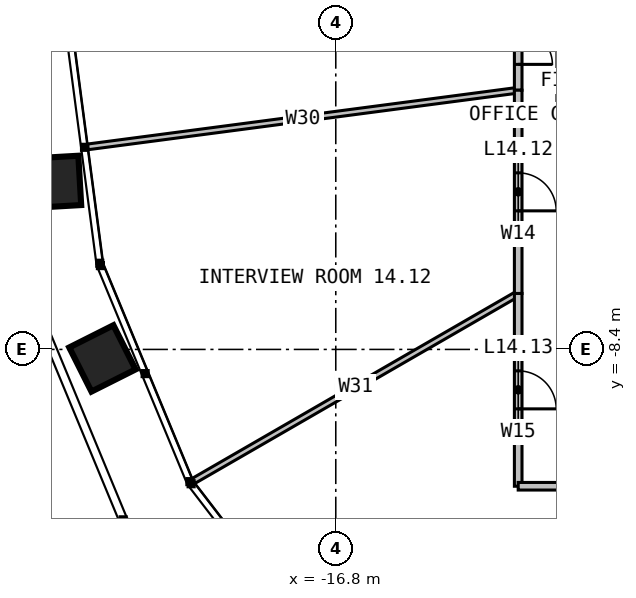
"""IFC4 building model, lengths in metres.
Left out: names, types, materials, properties, quantities, classifications, styles, units other than length and angle.
Written with IfcOpenShell. Run it as: python <this file> out.ifc"""

import sys

from ifc_helpers import new_model, si_unit, direction, frame, frame_2d, origin, place, context, subcontext, project, spatial, rectangle, extrude, element, fill, save


model = new_model("IFC4")
c1 = context("Model", 3, precision=1e-05, world=origin(), true_north=direction((0.0, 1.0)))
c2 = subcontext(c1, "Body", "Model", "MODEL_VIEW")
j1 = project(units=[si_unit("LENGTHUNIT", "METRE"), si_unit("PLANEANGLEUNIT", "RADIAN")], contexts=[c1])
p1 = place(None, origin())
s1 = spatial("IfcSite", under=j1, at=p1, CompositionType="ELEMENT")
p2 = place(p1, origin())
s2 = spatial("IfcBuilding", under=s1, at=p2, CompositionType="ELEMENT")
p3 = place(p2, frame((0.0, 0.0, 61.0)))
s3 = spatial("IfcBuildingStorey", under=s2, at=p3, CompositionType="ELEMENT", Elevation=61.0)
p4 = place(p3, frame((-12.0, -1.58, 0.0), z_axis=(0.0, 0.0, 1.0), x_axis=(-0.99144592532, -0.130518110492, 0.0)))
e1 = element("IfcWall", 1, at=p4, inside=s3, PredefinedType="PARTITIONING", context=c2, shape_type="SweptSolid", body=[
    extrude(rectangle(XDim=11.42, YDim=0.15, at=frame_2d((5.71, 0.0))), origin(), (0.0, 0.0, 1.0), 2.79),
])
for number, where, z_axis, x_axis in (
    (2, (-12.0, -6.928, 0.0), (0.0, 0.0, 1.0), (-0.866, -0.5, 0.0)),
    (3, (-6.928, -12.0, 0.0), (0.0, 0.0, 1.0), (-0.5, -0.866, 0.0)),
):
    element("IfcWall", number, at=place(p3, frame(where, z_axis=z_axis, x_axis=x_axis)), inside=s3, PredefinedType="PARTITIONING", context=c2, shape_type="SweptSolid", body=[
        extrude(rectangle(XDim=9.87, YDim=0.15, at=frame_2d((4.935, 0.0))), origin(), (0.0, 0.0, 1.0), 2.79),
    ])
p5 = place(p3, frame((-12.0, 1.58, 0.0), z_axis=(0.0, 0.0, 1.0), x_axis=(0.0, -1.0, 0.0)))
e4 = element("IfcWall", 4, at=p5, inside=s3, PredefinedType="PARTITIONING", context=c2, shape_type="SweptSolid", body=[
    extrude(rectangle(XDim=3.16, YDim=0.2, at=frame_2d((1.58, 0.0))), origin(), (0.0, 0.0, 1.0), 3.8),
])
p6 = place(p5, frame((0.68, 0.0, 0.0)))
e5 = element("IfcOpeningElement", 5, at=p6, cuts=e4, PredefinedType="OPENING", context=c2, shape_type="SweptSolid", body=[
    extrude(rectangle(XDim=1.8, YDim=2.2, at=frame_2d((0.9, 1.1))), frame((0.0, 0.11, 0.0), z_axis=(0.0, -1.0, 0.0), x_axis=(1.0, 0.0, 0.0)), (0.0, 0.0, 1.0), 0.22),
])
p7 = place(p3, frame((-12.0, -1.58, 0.0), z_axis=(0.0, 0.0, 1.0), x_axis=(0.0, -1.0, 0.0)))
e6 = element("IfcWall", 6, at=p7, inside=s3, PredefinedType="PARTITIONING", context=c2, shape_type="SweptSolid", body=[
    extrude(rectangle(XDim=5.348, YDim=0.2, at=frame_2d((2.674, 0.0))), origin(), (0.0, 0.0, 1.0), 3.8),
])
p8 = place(p7, frame((2.174, 0.0, 0.0)))
e7 = element("IfcOpeningElement", 7, at=p8, cuts=e6, PredefinedType="OPENING", context=c2, shape_type="SweptSolid", body=[
    extrude(rectangle(XDim=1.0, YDim=2.2, at=frame_2d((0.5, 1.1))), frame((0.0, 0.11, 0.0), z_axis=(0.0, -1.0, 0.0), x_axis=(1.0, 0.0, 0.0)), (0.0, 0.0, 1.0), 0.22),
])
p9 = place(p3, frame((-12.0, -6.928, 0.0), z_axis=(0.0, 0.0, 1.0), x_axis=(0.0, -1.0, 0.0)))
e8 = element("IfcWall", 8, at=p9, inside=s3, PredefinedType="PARTITIONING", context=c2, shape_type="SweptSolid", body=[
    extrude(rectangle(XDim=5.072, YDim=0.2, at=frame_2d((2.536, 0.0))), origin(), (0.0, 0.0, 1.0), 3.8),
])
p10 = place(p9, frame((2.036, 0.0, 0.0)))
e9 = element("IfcOpeningElement", 9, at=p10, cuts=e8, PredefinedType="OPENING", context=c2, shape_type="SweptSolid", body=[
    extrude(rectangle(XDim=1.0, YDim=2.2, at=frame_2d((0.5, 1.1))), frame((0.0, 0.11, 0.0), z_axis=(0.0, -1.0, 0.0), x_axis=(1.0, 0.0, 0.0)), (0.0, 0.0, 1.0), 0.22),
])
p11 = place(p3, frame((-12.0, -12.0, 0.0), z_axis=(0.0, 0.0, 1.0), x_axis=(1.0, 0.0, 0.0)))
e10 = element("IfcWall", 10, at=p11, inside=s3, PredefinedType="PARTITIONING", context=c2, shape_type="SweptSolid", body=[
    extrude(rectangle(XDim=5.072, YDim=0.2, at=frame_2d((2.536, 0.0))), origin(), (0.0, 0.0, 1.0), 3.8),
])
p12 = place(p6, origin())
e11 = element("IfcDoor", 11, at=p12, inside=s3, OperationType="DOUBLE_DOOR_SINGLE_SWING", PredefinedType="DOOR", context=c2, shape_type="SweptSolid", body=[
    extrude(rectangle(XDim=1.8, YDim=2.2, at=frame_2d((0.9, 1.1))), frame((0.0, 0.025, 0.0), z_axis=(0.0, -1.0, 0.0), x_axis=(1.0, 0.0, 0.0)), (0.0, 0.0, 1.0), 0.05),
])
fill(e5, e11)
p13 = place(p8, origin())
e12 = element("IfcDoor", 12, at=p13, inside=s3, OperationType="SINGLE_SWING_RIGHT", PredefinedType="DOOR", context=c2, shape_type="SweptSolid", body=[
    extrude(rectangle(XDim=1.0, YDim=2.2, at=frame_2d((0.5, 1.1))), frame((0.0, 0.025, 0.0), z_axis=(0.0, -1.0, 0.0), x_axis=(1.0, 0.0, 0.0)), (0.0, 0.0, 1.0), 0.05),
])
fill(e7, e12)
p14 = place(p10, origin())
e13 = element("IfcDoor", 13, at=p14, inside=s3, OperationType="SINGLE_SWING_RIGHT", PredefinedType="DOOR", context=c2, shape_type="SweptSolid", body=[
    extrude(rectangle(XDim=1.0, YDim=2.2, at=frame_2d((0.5, 1.1))), frame((0.0, 0.025, 0.0), z_axis=(0.0, -1.0, 0.0), x_axis=(1.0, 0.0, 0.0)), (0.0, 0.0, 1.0), 0.05),
])
fill(e9, e13)
save(model, sys.argv[1])
